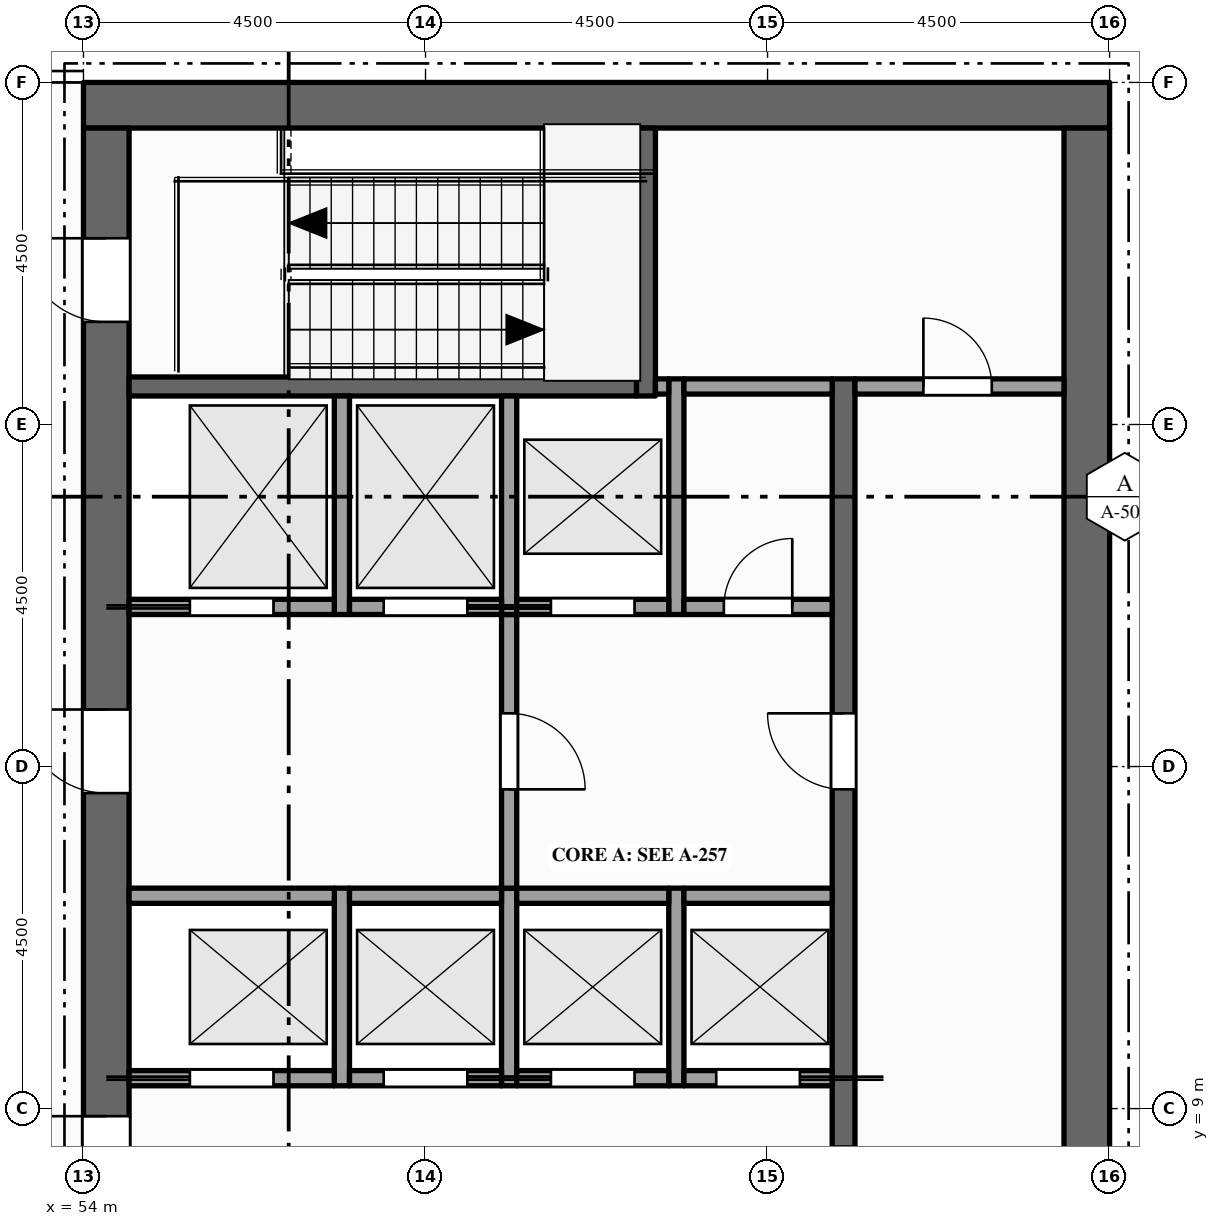
"""IFC4 building model, lengths in metres.
Left out: names, types, materials, properties, quantities, classifications, styles, units other than length and angle.
Written with IfcOpenShell. Run it as: python <this file> out.ifc"""

import sys

from ifc_helpers import new_model, si_unit, direction, frame, frame_2d, origin, place, context, subcontext, project, spatial, rectangle, extrude, element, fill, save


model = new_model("IFC4")
c1 = context("Model", 3, precision=1e-05, world=origin(), true_north=direction((0.0, 1.0)))
c2 = subcontext(c1, "Body", "Model", "MODEL_VIEW")
j1 = project(units=[si_unit("LENGTHUNIT", "METRE"), si_unit("PLANEANGLEUNIT", "RADIAN")], contexts=[c1])
p1 = place(None, origin())
s1 = spatial("IfcSite", under=j1, at=p1, CompositionType="ELEMENT")
p2 = place(p1, origin())
s2 = spatial("IfcBuilding", under=s1, at=p2, CompositionType="ELEMENT")
p3 = place(p2, frame((0.0, 0.0, 318.5)))
s3 = spatial("IfcBuildingStorey", under=s2, at=p3, CompositionType="ELEMENT", Elevation=318.5)
p4 = place(p3, frame((54.0, 22.2, -0.15), z_axis=(0.0, 0.0, 1.0), x_axis=(1.0, 0.0, 0.0)))
e1 = element("IfcWall", 1, at=p4, inside=s3, PredefinedType="SHEAR", context=c2, shape_type="SweptSolid", body=[
    extrude(rectangle(XDim=13.5, YDim=0.6, at=frame_2d((6.75, 0.0))), origin(), (0.0, 0.0, 1.0), 4.5),
])
p5 = place(p3, frame((54.3, 0.6, -0.15), z_axis=(0.0, 0.0, 1.0), x_axis=(0.0, 1.0, 0.0)))
e2 = element("IfcWall", 2, at=p5, inside=s3, PredefinedType="SHEAR", context=c2, shape_type="SweptSolid", body=[
    extrude(rectangle(XDim=21.3, YDim=0.6, at=frame_2d((10.65, 0.0))), origin(), (0.0, 0.0, 1.0), 4.5),
])
p6 = place(p5, frame((6.5, 0.0, 0.15)))
e3 = element("IfcOpeningElement", 3, at=p6, cuts=e2, PredefinedType="OPENING", context=c2, shape_type="SweptSolid", body=[
    extrude(rectangle(XDim=1.8, YDim=2.1, at=frame_2d((0.9, 1.05))), frame((0.0, 0.31, 0.0), z_axis=(0.0, -1.0, 0.0), x_axis=(1.0, 0.0, 0.0)), (0.0, 0.0, 1.0), 0.62),
])
p7 = place(p5, frame((12.55, 0.0, 0.15)))
e4 = element("IfcOpeningElement", 4, at=p7, cuts=e2, PredefinedType="OPENING", context=c2, shape_type="SweptSolid", body=[
    extrude(rectangle(XDim=1.1, YDim=2.1, at=frame_2d((0.55, 1.05))), frame((0.0, 0.31, 0.0), z_axis=(0.0, -1.0, 0.0), x_axis=(1.0, 0.0, 0.0)), (0.0, 0.0, 1.0), 0.62),
])
p8 = place(p5, frame((1.55, 0.0, 0.15)))
e5 = element("IfcOpeningElement", 5, at=p8, cuts=e2, PredefinedType="OPENING", context=c2, shape_type="SweptSolid", body=[
    extrude(rectangle(XDim=1.1, YDim=2.1, at=frame_2d((0.55, 1.05))), frame((0.0, 0.31, 0.0), z_axis=(0.0, -1.0, 0.0), x_axis=(1.0, 0.0, 0.0)), (0.0, 0.0, 1.0), 0.62),
])
p9 = place(p5, frame((18.75, 0.0, 0.15)))
e6 = element("IfcOpeningElement", 6, at=p9, cuts=e2, PredefinedType="OPENING", context=c2, shape_type="SweptSolid", body=[
    extrude(rectangle(XDim=1.1, YDim=2.1, at=frame_2d((0.55, 1.05))), frame((0.0, 0.31, 0.0), z_axis=(0.0, -1.0, 0.0), x_axis=(1.0, 0.0, 0.0)), (0.0, 0.0, 1.0), 0.62),
])
p10 = place(p3, frame((67.2, 0.6, -0.15), z_axis=(0.0, 0.0, 1.0), x_axis=(0.0, 1.0, 0.0)))
e7 = element("IfcWall", 7, at=p10, inside=s3, PredefinedType="SHEAR", context=c2, shape_type="SweptSolid", body=[
    extrude(rectangle(XDim=21.3, YDim=0.6, at=frame_2d((10.65, 0.0))), origin(), (0.0, 0.0, 1.0), 4.5),
])
p11 = place(p3, frame((57.4, 9.3, 0.0), z_axis=(0.0, 0.0, 1.0), x_axis=(0.0, 1.0, 0.0)))
e8 = element("IfcWall", 8, at=p11, inside=s3, PredefinedType="SOLIDWALL", context=c2, shape_type="SweptSolid", body=[
    extrude(rectangle(XDim=2.6, YDim=0.2, at=frame_2d((1.3, 0.0))), origin(), (0.0, 0.0, 1.0), 4.35),
])
p12 = place(p3, frame((57.4, 15.5, 0.0), z_axis=(0.0, 0.0, 1.0), x_axis=(0.0, 1.0, 0.0)))
e9 = element("IfcWall", 9, at=p12, inside=s3, PredefinedType="SOLIDWALL", context=c2, shape_type="SweptSolid", body=[
    extrude(rectangle(XDim=2.875, YDim=0.2, at=frame_2d((1.438, 0.0))), origin(), (0.0, 0.0, 1.0), 4.35),
])
p13 = place(p3, frame((59.6, 9.3, 0.0), z_axis=(0.0, 0.0, 1.0), x_axis=(0.0, 1.0, 0.0)))
e10 = element("IfcWall", 10, at=p13, inside=s3, PredefinedType="SOLIDWALL", context=c2, shape_type="SweptSolid", body=[
    extrude(rectangle(XDim=2.6, YDim=0.2, at=frame_2d((1.3, 0.0))), origin(), (0.0, 0.0, 1.0), 4.35),
])
p14 = place(p3, frame((59.6, 11.9, 0.0), z_axis=(0.0, 0.0, 1.0), x_axis=(0.0, 1.0, 0.0)))
e11 = element("IfcWall", 11, at=p14, inside=s3, PredefinedType="PARTITIONING", context=c2, shape_type="SweptSolid", body=[
    extrude(rectangle(XDim=3.6, YDim=0.2, at=frame_2d((1.8, 0.0))), origin(), (0.0, 0.0, 1.0), 4.35),
])
p15 = place(p14, frame((1.3, 0.0, 0.0)))
e12 = element("IfcOpeningElement", 12, at=p15, cuts=e11, PredefinedType="OPENING", context=c2, shape_type="SweptSolid", body=[
    extrude(rectangle(XDim=1.0, YDim=2.1, at=frame_2d((0.5, 1.05))), frame((0.0, 0.11, 0.0), z_axis=(0.0, -1.0, 0.0), x_axis=(1.0, 0.0, 0.0)), (0.0, 0.0, 1.0), 0.22),
])
p16 = place(p3, frame((59.6, 15.5, 0.0), z_axis=(0.0, 0.0, 1.0), x_axis=(0.0, 1.0, 0.0)))
e13 = element("IfcWall", 13, at=p16, inside=s3, PredefinedType="SOLIDWALL", context=c2, shape_type="SweptSolid", body=[
    extrude(rectangle(XDim=2.875, YDim=0.2, at=frame_2d((1.438, 0.0))), origin(), (0.0, 0.0, 1.0), 4.35),
])
p17 = place(p3, frame((61.4, 18.375, 0.0), z_axis=(0.0, 0.0, 1.0), x_axis=(0.0, 1.0, 0.0)))
e14 = element("IfcWall", 14, at=p17, inside=s3, PredefinedType="SHEAR", context=c2, shape_type="SweptSolid", body=[
    extrude(rectangle(XDim=3.525, YDim=0.25, at=frame_2d((1.762, 0.0))), origin(), (0.0, 0.0, 1.0), 4.35),
])
p18 = place(p3, frame((61.8, 9.3, 0.0), z_axis=(0.0, 0.0, 1.0), x_axis=(0.0, 1.0, 0.0)))
e15 = element("IfcWall", 15, at=p18, inside=s3, PredefinedType="SOLIDWALL", context=c2, shape_type="SweptSolid", body=[
    extrude(rectangle(XDim=2.6, YDim=0.2, at=frame_2d((1.3, 0.0))), origin(), (0.0, 0.0, 1.0), 4.35),
])
p19 = place(p3, frame((61.8, 15.5, 0.0), z_axis=(0.0, 0.0, 1.0), x_axis=(0.0, 1.0, 0.0)))
e16 = element("IfcWall", 16, at=p19, inside=s3, PredefinedType="SOLIDWALL", context=c2, shape_type="SweptSolid", body=[
    extrude(rectangle(XDim=3.1, YDim=0.2, at=frame_2d((1.55, 0.0))), origin(), (0.0, 0.0, 1.0), 4.35),
])
p20 = place(p3, frame((64.0, 4.1, 0.0), z_axis=(0.0, 0.0, 1.0), x_axis=(0.0, 1.0, 0.0)))
e17 = element("IfcWall", 17, at=p20, inside=s3, PredefinedType="SHEAR", context=c2, shape_type="SweptSolid", body=[
    extrude(rectangle(XDim=14.5, YDim=0.3, at=frame_2d((7.25, 0.0))), origin(), (0.0, 0.0, 1.0), 4.35),
])
p21 = place(p20, frame((3.4, 0.0, 0.0)))
e18 = element("IfcOpeningElement", 18, at=p21, cuts=e17, PredefinedType="OPENING", context=c2, shape_type="SweptSolid", body=[
    extrude(rectangle(XDim=1.0, YDim=2.1, at=frame_2d((0.5, 1.05))), frame((0.0, 0.16, 0.0), z_axis=(0.0, -1.0, 0.0), x_axis=(1.0, 0.0, 0.0)), (0.0, 0.0, 1.0), 0.32),
])
p22 = place(p20, frame((9.1, 0.0, 0.0)))
e19 = element("IfcOpeningElement", 19, at=p22, cuts=e17, PredefinedType="OPENING", context=c2, shape_type="SweptSolid", body=[
    extrude(rectangle(XDim=1.0, YDim=2.1, at=frame_2d((0.5, 1.05))), frame((0.0, 0.16, 0.0), z_axis=(0.0, -1.0, 0.0), x_axis=(1.0, 0.0, 0.0)), (0.0, 0.0, 1.0), 0.32),
])
p23 = place(p3, frame((54.6, 9.4, 0.0), z_axis=(0.0, 0.0, 1.0), x_axis=(1.0, 0.0, 0.0)))
e20 = element("IfcWall", 20, at=p23, inside=s3, PredefinedType="SOLIDWALL", context=c2, shape_type="SweptSolid", body=[
    extrude(rectangle(XDim=2.7, YDim=0.2, at=frame_2d((1.35, 0.0))), origin(), (0.0, 0.0, 1.0), 4.35),
])
p24 = place(p23, frame((0.8, 0.0, 0.012)))
e21 = element("IfcOpeningElement", 21, at=p24, cuts=e20, PredefinedType="OPENING", context=c2, shape_type="SweptSolid", body=[
    extrude(rectangle(XDim=1.1, YDim=2.1, at=frame_2d((0.55, 1.05))), frame((0.0, 0.11, 0.0), z_axis=(0.0, -1.0, 0.0), x_axis=(1.0, 0.0, 0.0)), (0.0, 0.0, 1.0), 0.22),
])
p25 = place(p3, frame((57.5, 9.4, 0.0), z_axis=(0.0, 0.0, 1.0), x_axis=(1.0, 0.0, 0.0)))
e22 = element("IfcWall", 22, at=p25, inside=s3, PredefinedType="SOLIDWALL", context=c2, shape_type="SweptSolid", body=[
    extrude(rectangle(XDim=2.0, YDim=0.2, at=frame_2d((1.0, 0.0))), origin(), (0.0, 0.0, 1.0), 4.35),
])
p26 = place(p25, frame((0.45, 0.0, 0.012)))
e23 = element("IfcOpeningElement", 23, at=p26, cuts=e22, PredefinedType="OPENING", context=c2, shape_type="SweptSolid", body=[
    extrude(rectangle(XDim=1.1, YDim=2.1, at=frame_2d((0.55, 1.05))), frame((0.0, 0.11, 0.0), z_axis=(0.0, -1.0, 0.0), x_axis=(1.0, 0.0, 0.0)), (0.0, 0.0, 1.0), 0.22),
])
p27 = place(p3, frame((59.7, 9.4, 0.0), z_axis=(0.0, 0.0, 1.0), x_axis=(1.0, 0.0, 0.0)))
e24 = element("IfcWall", 24, at=p27, inside=s3, PredefinedType="SOLIDWALL", context=c2, shape_type="SweptSolid", body=[
    extrude(rectangle(XDim=2.0, YDim=0.2, at=frame_2d((1.0, 0.0))), origin(), (0.0, 0.0, 1.0), 4.35),
])
p28 = place(p27, frame((0.45, 0.0, 0.012)))
e25 = element("IfcOpeningElement", 25, at=p28, cuts=e24, PredefinedType="OPENING", context=c2, shape_type="SweptSolid", body=[
    extrude(rectangle(XDim=1.1, YDim=2.1, at=frame_2d((0.55, 1.05))), frame((0.0, 0.11, 0.0), z_axis=(0.0, -1.0, 0.0), x_axis=(1.0, 0.0, 0.0)), (0.0, 0.0, 1.0), 0.22),
])
p29 = place(p3, frame((61.9, 9.4, 0.0), z_axis=(0.0, 0.0, 1.0), x_axis=(1.0, 0.0, 0.0)))
e26 = element("IfcWall", 26, at=p29, inside=s3, PredefinedType="SOLIDWALL", context=c2, shape_type="SweptSolid", body=[
    extrude(rectangle(XDim=1.95, YDim=0.2, at=frame_2d((0.975, 0.0))), origin(), (0.0, 0.0, 1.0), 4.35),
])
p30 = place(p29, frame((0.425, 0.0, 0.012)))
e27 = element("IfcOpeningElement", 27, at=p30, cuts=e26, PredefinedType="OPENING", context=c2, shape_type="SweptSolid", body=[
    extrude(rectangle(XDim=1.1, YDim=2.1, at=frame_2d((0.55, 1.05))), frame((0.0, 0.11, 0.0), z_axis=(0.0, -1.0, 0.0), x_axis=(1.0, 0.0, 0.0)), (0.0, 0.0, 1.0), 0.22),
])
p31 = place(p3, frame((54.6, 11.8, 0.0), z_axis=(0.0, 0.0, 1.0), x_axis=(1.0, 0.0, 0.0)))
e28 = element("IfcWall", 28, at=p31, inside=s3, PredefinedType="SOLIDWALL", context=c2, shape_type="SweptSolid", body=[
    extrude(rectangle(XDim=2.7, YDim=0.2, at=frame_2d((1.35, 0.0))), origin(), (0.0, 0.0, 1.0), 4.35),
])
for number, where, z_axis, x_axis in (
    (29, (57.5, 11.8, 0.0), (0.0, 0.0, 1.0), (1.0, 0.0, 0.0)),
    (30, (59.7, 11.8, 0.0), (0.0, 0.0, 1.0), (1.0, 0.0, 0.0)),
):
    element("IfcWall", number, at=place(p3, frame(where, z_axis=z_axis, x_axis=x_axis)), inside=s3, PredefinedType="SOLIDWALL", context=c2, shape_type="SweptSolid", body=[
        extrude(rectangle(XDim=2.0, YDim=0.2, at=frame_2d((1.0, 0.0))), origin(), (0.0, 0.0, 1.0), 4.35),
    ])
p32 = place(p3, frame((61.9, 11.8, 0.0), z_axis=(0.0, 0.0, 1.0), x_axis=(1.0, 0.0, 0.0)))
e31 = element("IfcWall", 31, at=p32, inside=s3, PredefinedType="SOLIDWALL", context=c2, shape_type="SweptSolid", body=[
    extrude(rectangle(XDim=1.95, YDim=0.2, at=frame_2d((0.975, 0.0))), origin(), (0.0, 0.0, 1.0), 4.35),
])
p33 = place(p3, frame((54.6, 15.6, 0.0), z_axis=(0.0, 0.0, 1.0), x_axis=(1.0, 0.0, 0.0)))
e32 = element("IfcWall", 32, at=p33, inside=s3, PredefinedType="SOLIDWALL", context=c2, shape_type="SweptSolid", body=[
    extrude(rectangle(XDim=2.7, YDim=0.2, at=frame_2d((1.35, 0.0))), origin(), (0.0, 0.0, 1.0), 4.35),
])
p34 = place(p33, frame((0.8, 0.0, 0.012)))
e33 = element("IfcOpeningElement", 33, at=p34, cuts=e32, PredefinedType="OPENING", context=c2, shape_type="SweptSolid", body=[
    extrude(rectangle(XDim=1.1, YDim=2.1, at=frame_2d((0.55, 1.05))), frame((0.0, 0.11, 0.0), z_axis=(0.0, -1.0, 0.0), x_axis=(1.0, 0.0, 0.0)), (0.0, 0.0, 1.0), 0.22),
])
p35 = place(p3, frame((57.5, 15.6, 0.0), z_axis=(0.0, 0.0, 1.0), x_axis=(1.0, 0.0, 0.0)))
e34 = element("IfcWall", 34, at=p35, inside=s3, PredefinedType="SOLIDWALL", context=c2, shape_type="SweptSolid", body=[
    extrude(rectangle(XDim=2.0, YDim=0.2, at=frame_2d((1.0, 0.0))), origin(), (0.0, 0.0, 1.0), 4.35),
])
p36 = place(p35, frame((0.45, 0.0, 0.012)))
e35 = element("IfcOpeningElement", 35, at=p36, cuts=e34, PredefinedType="OPENING", context=c2, shape_type="SweptSolid", body=[
    extrude(rectangle(XDim=1.1, YDim=2.1, at=frame_2d((0.55, 1.05))), frame((0.0, 0.11, 0.0), z_axis=(0.0, -1.0, 0.0), x_axis=(1.0, 0.0, 0.0)), (0.0, 0.0, 1.0), 0.22),
])
p37 = place(p3, frame((59.7, 15.6, 0.0), z_axis=(0.0, 0.0, 1.0), x_axis=(1.0, 0.0, 0.0)))
e36 = element("IfcWall", 36, at=p37, inside=s3, PredefinedType="SOLIDWALL", context=c2, shape_type="SweptSolid", body=[
    extrude(rectangle(XDim=2.0, YDim=0.2, at=frame_2d((1.0, 0.0))), origin(), (0.0, 0.0, 1.0), 4.35),
])
p38 = place(p37, frame((0.45, 0.0, 0.012)))
e37 = element("IfcOpeningElement", 37, at=p38, cuts=e36, PredefinedType="OPENING", context=c2, shape_type="SweptSolid", body=[
    extrude(rectangle(XDim=1.1, YDim=2.1, at=frame_2d((0.55, 1.05))), frame((0.0, 0.11, 0.0), z_axis=(0.0, -1.0, 0.0), x_axis=(1.0, 0.0, 0.0)), (0.0, 0.0, 1.0), 0.22),
])
p39 = place(p3, frame((61.9, 15.6, 0.0), z_axis=(0.0, 0.0, 1.0), x_axis=(1.0, 0.0, 0.0)))
e38 = element("IfcWall", 38, at=p39, inside=s3, PredefinedType="PARTITIONING", context=c2, shape_type="SweptSolid", body=[
    extrude(rectangle(XDim=1.95, YDim=0.2, at=frame_2d((0.975, 0.0))), origin(), (0.0, 0.0, 1.0), 4.35),
])
p40 = place(p39, frame((0.525, 0.0, 0.0)))
e39 = element("IfcOpeningElement", 39, at=p40, cuts=e38, PredefinedType="OPENING", context=c2, shape_type="SweptSolid", body=[
    extrude(rectangle(XDim=0.9, YDim=2.1, at=frame_2d((0.45, 1.05))), frame((0.0, 0.11, 0.0), z_axis=(0.0, -1.0, 0.0), x_axis=(1.0, 0.0, 0.0)), (0.0, 0.0, 1.0), 0.22),
])
p41 = place(p3, frame((54.6, 18.5, 0.0), z_axis=(0.0, 0.0, 1.0), x_axis=(1.0, 0.0, 0.0)))
e40 = element("IfcWall", 40, at=p41, inside=s3, PredefinedType="SHEAR", context=c2, shape_type="SweptSolid", body=[
    extrude(rectangle(XDim=6.675, YDim=0.25, at=frame_2d((3.337, 0.0))), origin(), (0.0, 0.0, 1.0), 4.35),
])
p42 = place(p3, frame((61.525, 18.5, 0.0), z_axis=(0.0, 0.0, 1.0), x_axis=(1.0, 0.0, 0.0)))
e41 = element("IfcWall", 41, at=p42, inside=s3, PredefinedType="SOLIDWALL", context=c2, shape_type="SweptSolid", body=[
    extrude(rectangle(XDim=0.175, YDim=0.2, at=frame_2d((0.087, 0.0))), origin(), (0.0, 0.0, 1.0), 4.35),
])
p43 = place(p3, frame((61.9, 18.5, 0.0), z_axis=(0.0, 0.0, 1.0), x_axis=(1.0, 0.0, 0.0)))
e42 = element("IfcWall", 42, at=p43, inside=s3, PredefinedType="PARTITIONING", context=c2, shape_type="SweptSolid", body=[
    extrude(rectangle(XDim=1.95, YDim=0.2, at=frame_2d((0.975, 0.0))), origin(), (0.0, 0.0, 1.0), 4.35),
])
p44 = place(p3, frame((64.15, 18.5, 0.0), z_axis=(0.0, 0.0, 1.0), x_axis=(1.0, 0.0, 0.0)))
e43 = element("IfcWall", 43, at=p44, inside=s3, PredefinedType="PARTITIONING", context=c2, shape_type="SweptSolid", body=[
    extrude(rectangle(XDim=2.75, YDim=0.2, at=frame_2d((1.375, 0.0))), origin(), (0.0, 0.0, 1.0), 4.35),
])
p45 = place(p44, frame((0.9, 0.0, 0.0)))
e44 = element("IfcOpeningElement", 44, at=p45, cuts=e43, PredefinedType="OPENING", context=c2, shape_type="SweptSolid", body=[
    extrude(rectangle(XDim=0.9, YDim=2.1, at=frame_2d((0.45, 1.05))), frame((0.0, 0.11, 0.0), z_axis=(0.0, -1.0, 0.0), x_axis=(1.0, 0.0, 0.0)), (0.0, 0.0, 1.0), 0.22),
])
p46 = place(p24, origin())
e45 = element("IfcDoor", 45, at=p46, inside=s3, OperationType="SLIDING_TO_LEFT", PredefinedType="DOOR", context=c2, shape_type="SweptSolid", body=[
    extrude(rectangle(XDim=1.1, YDim=2.1, at=frame_2d((0.55, 1.05))), frame((0.0, 0.025, 0.0), z_axis=(0.0, -1.0, 0.0), x_axis=(1.0, 0.0, 0.0)), (0.0, 0.0, 1.0), 0.05),
])
fill(e21, e45)
p47 = place(p26, origin())
e46 = element("IfcDoor", 46, at=p47, inside=s3, OperationType="SLIDING_TO_RIGHT", PredefinedType="DOOR", context=c2, shape_type="SweptSolid", body=[
    extrude(rectangle(XDim=1.1, YDim=2.1, at=frame_2d((0.55, 1.05))), frame((0.0, 0.025, 0.0), z_axis=(0.0, -1.0, 0.0), x_axis=(1.0, 0.0, 0.0)), (0.0, 0.0, 1.0), 0.05),
])
fill(e23, e46)
p48 = place(p28, origin())
e47 = element("IfcDoor", 47, at=p48, inside=s3, OperationType="SLIDING_TO_LEFT", PredefinedType="DOOR", context=c2, shape_type="SweptSolid", body=[
    extrude(rectangle(XDim=1.1, YDim=2.1, at=frame_2d((0.55, 1.05))), frame((0.0, 0.025, 0.0), z_axis=(0.0, -1.0, 0.0), x_axis=(1.0, 0.0, 0.0)), (0.0, 0.0, 1.0), 0.05),
])
fill(e25, e47)
p49 = place(p30, origin())
e48 = element("IfcDoor", 48, at=p49, inside=s3, OperationType="SLIDING_TO_RIGHT", PredefinedType="DOOR", context=c2, shape_type="SweptSolid", body=[
    extrude(rectangle(XDim=1.1, YDim=2.1, at=frame_2d((0.55, 1.05))), frame((0.0, 0.025, 0.0), z_axis=(0.0, -1.0, 0.0), x_axis=(1.0, 0.0, 0.0)), (0.0, 0.0, 1.0), 0.05),
])
fill(e27, e48)
p50 = place(p34, origin())
e49 = element("IfcDoor", 49, at=p50, inside=s3, OperationType="SLIDING_TO_LEFT", PredefinedType="DOOR", context=c2, shape_type="SweptSolid", body=[
    extrude(rectangle(XDim=1.1, YDim=2.1, at=frame_2d((0.55, 1.05))), frame((0.0, 0.025, 0.0), z_axis=(0.0, -1.0, 0.0), x_axis=(1.0, 0.0, 0.0)), (0.0, 0.0, 1.0), 0.05),
])
fill(e33, e49)
p51 = place(p36, origin())
e50 = element("IfcDoor", 50, at=p51, inside=s3, OperationType="SLIDING_TO_RIGHT", PredefinedType="DOOR", context=c2, shape_type="SweptSolid", body=[
    extrude(rectangle(XDim=1.1, YDim=2.1, at=frame_2d((0.55, 1.05))), frame((0.0, 0.025, 0.0), z_axis=(0.0, -1.0, 0.0), x_axis=(1.0, 0.0, 0.0)), (0.0, 0.0, 1.0), 0.05),
])
fill(e35, e50)
p52 = place(p38, origin())
e51 = element("IfcDoor", 51, at=p52, inside=s3, OperationType="SLIDING_TO_LEFT", PredefinedType="DOOR", context=c2, shape_type="SweptSolid", body=[
    extrude(rectangle(XDim=1.1, YDim=2.1, at=frame_2d((0.55, 1.05))), frame((0.0, 0.025, 0.0), z_axis=(0.0, -1.0, 0.0), x_axis=(1.0, 0.0, 0.0)), (0.0, 0.0, 1.0), 0.05),
])
fill(e37, e51)
p53 = place(p6, origin())
e52 = element("IfcDoor", 52, at=p53, inside=s3, OperationType="DOUBLE_DOOR_SINGLE_SWING", PredefinedType="DOOR", context=c2, shape_type="SweptSolid", body=[
    extrude(rectangle(XDim=1.8, YDim=2.1, at=frame_2d((0.9, 1.05))), frame((0.0, 0.025, 0.0), z_axis=(0.0, -1.0, 0.0), x_axis=(1.0, 0.0, 0.0)), (0.0, 0.0, 1.0), 0.05),
])
fill(e3, e52)
p54 = place(p7, origin())
e53 = element("IfcDoor", 53, at=p54, inside=s3, OperationType="SINGLE_SWING_RIGHT", PredefinedType="DOOR", context=c2, shape_type="SweptSolid", body=[
    extrude(rectangle(XDim=1.1, YDim=2.1, at=frame_2d((0.55, 1.05))), frame((0.0, 0.025, 0.0), z_axis=(0.0, -1.0, 0.0), x_axis=(1.0, 0.0, 0.0)), (0.0, 0.0, 1.0), 0.05),
])
fill(e4, e53)
p55 = place(p15, origin())
e54 = element("IfcDoor", 54, at=p55, inside=s3, OperationType="SINGLE_SWING_LEFT", PredefinedType="DOOR", context=c2, shape_type="SweptSolid", body=[
    extrude(rectangle(XDim=1.0, YDim=2.1, at=frame_2d((0.5, 1.05))), frame((0.0, 0.025, 0.0), z_axis=(0.0, -1.0, 0.0), x_axis=(1.0, 0.0, 0.0)), (0.0, 0.0, 1.0), 0.05),
])
fill(e12, e54)
p56 = place(p22, origin())
e55 = element("IfcDoor", 55, at=p56, inside=s3, OperationType="SINGLE_SWING_RIGHT", PredefinedType="DOOR", context=c2, shape_type="SweptSolid", body=[
    extrude(rectangle(XDim=1.0, YDim=2.1, at=frame_2d((0.5, 1.05))), frame((0.0, 0.025, 0.0), z_axis=(0.0, -1.0, 0.0), x_axis=(1.0, 0.0, 0.0)), (0.0, 0.0, 1.0), 0.05),
])
fill(e19, e55)
p57 = place(p9, origin())
e56 = element("IfcDoor", 56, at=p57, inside=s3, OperationType="SINGLE_SWING_RIGHT", PredefinedType="DOOR", context=c2, shape_type="SweptSolid", body=[
    extrude(rectangle(XDim=1.1, YDim=2.1, at=frame_2d((0.55, 1.05))), frame((0.0, 0.025, 0.0), z_axis=(0.0, -1.0, 0.0), x_axis=(1.0, 0.0, 0.0)), (0.0, 0.0, 1.0), 0.05),
])
fill(e6, e56)
p58 = place(p45, origin())
e57 = element("IfcDoor", 57, at=p58, inside=s3, OperationType="SINGLE_SWING_LEFT", PredefinedType="DOOR", context=c2, shape_type="SweptSolid", body=[
    extrude(rectangle(XDim=0.9, YDim=2.1, at=frame_2d((0.45, 1.05))), frame((0.0, 0.025, 0.0), z_axis=(0.0, -1.0, 0.0), x_axis=(1.0, 0.0, 0.0)), (0.0, 0.0, 1.0), 0.05),
])
fill(e44, e57)
p59 = place(p40, origin())
e58 = element("IfcDoor", 58, at=p59, inside=s3, OperationType="SINGLE_SWING_RIGHT", PredefinedType="DOOR", context=c2, shape_type="SweptSolid", body=[
    extrude(rectangle(XDim=0.9, YDim=2.1, at=frame_2d((0.45, 1.05))), frame((0.0, 0.025, 0.0), z_axis=(0.0, -1.0, 0.0), x_axis=(1.0, 0.0, 0.0)), (0.0, 0.0, 1.0), 0.05),
])
fill(e39, e58)
save(model, sys.argv[1])
